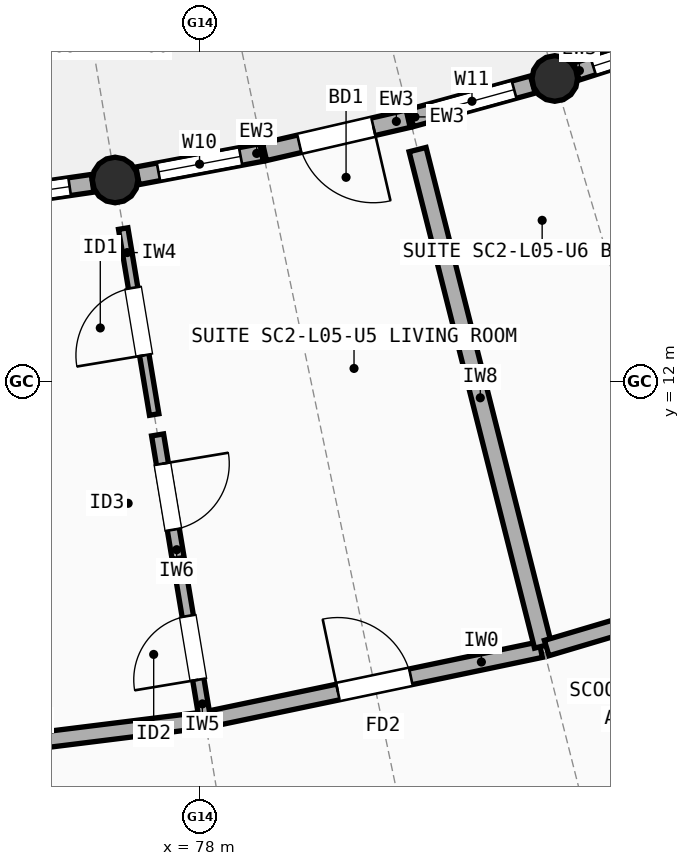
"""IFC4 building model, lengths in metres.
Left out: names, types, materials, properties, quantities, classifications, styles, units other than length and angle.
Written with IfcOpenShell. Run it as: python <this file> out.ifc"""

import sys

from ifc_helpers import new_model, si_unit, direction, frame, frame_2d, origin, origin_2d, place, context, subcontext, project, spatial, rectangle, circle, extrude, element, fill, save


model = new_model("IFC4")
c1 = context("Model", 3, precision=1e-05, world=origin(), true_north=direction((0.0, 1.0)))
c2 = subcontext(c1, "Body", "Model", "MODEL_VIEW")
j1 = project(units=[si_unit("LENGTHUNIT", "METRE"), si_unit("PLANEANGLEUNIT", "RADIAN")], contexts=[c1])
p1 = place(None, origin())
s1 = spatial("IfcSite", under=j1, at=p1, CompositionType="ELEMENT")
p2 = place(p1, origin())
s2 = spatial("IfcBuilding", under=s1, at=p2, CompositionType="ELEMENT")
p3 = place(p2, frame((0.0, 0.0, 17.3)))
s3 = spatial("IfcBuildingStorey", under=s2, at=p3, CompositionType="ELEMENT", Elevation=17.3)
for number, where, z_axis, x_axis in (
    (1, (76.885, 14.652, 0.0), (0.0, 0.0, 1.0), (1.0, 0.0, 0.0)),
    (2, (82.669, 15.988, 0.0), (0.0, 0.0, 1.0), (1.0, 0.0, 0.0)),
):
    element("IfcColumn", number, at=place(p3, frame(where, z_axis=z_axis, x_axis=x_axis)), inside=s3, PredefinedType="COLUMN", context=c2, shape_type="SweptSolid", body=[
        extrude(circle(Radius=0.3, at=origin_2d()), origin(), (0.0, 0.0, 1.0), 2.94),
    ])
p4 = place(p3, frame((74.945, 14.37, 0.0), z_axis=(0.0, 0.0, 1.0), x_axis=(0.989602429917, 0.14382986721, 0.0)))
e3 = element("IfcWall", 3, at=p4, inside=s3, PredefinedType="STANDARD", context=c2, shape_type="SweptSolid", body=[
    extrude(rectangle(XDim=1.66, YDim=0.235, at=frame_2d((0.83, 0.0))), origin(), (0.0, 0.0, 1.0), 2.676),
])
p5 = place(p4, frame((0.305, 0.0, 0.85)))
e4 = element("IfcOpeningElement", 4, at=p5, cuts=e3, PredefinedType="OPENING", context=c2, shape_type="SweptSolid", body=[
    extrude(rectangle(XDim=1.05, YDim=1.35, at=frame_2d((0.525, 0.675))), frame((0.0, 0.127, 0.0), z_axis=(0.0, -1.0, 0.0), x_axis=(1.0, 0.0, 0.0)), (0.0, 0.0, 1.0), 0.255),
])
p6 = place(p3, frame((77.179, 14.708, 0.0), z_axis=(0.0, 0.0, 1.0), x_axis=(0.982820537681, 0.184563784945, 0.0)))
e5 = element("IfcWall", 5, at=p6, inside=s3, PredefinedType="STANDARD", context=c2, shape_type="SweptSolid", body=[
    extrude(rectangle(XDim=1.66, YDim=0.235, at=frame_2d((0.83, 0.0))), origin(), (0.0, 0.0, 1.0), 2.676),
])
p7 = place(p6, frame((0.28, 0.0, 0.85)))
e6 = element("IfcOpeningElement", 6, at=p7, cuts=e5, PredefinedType="OPENING", context=c2, shape_type="SweptSolid", body=[
    extrude(rectangle(XDim=1.1, YDim=1.45, at=frame_2d((0.55, 0.725))), frame((0.0, 0.127, 0.0), z_axis=(0.0, -1.0, 0.0), x_axis=(1.0, 0.0, 0.0)), (0.0, 0.0, 1.0), 0.255),
])
p8 = place(p3, frame((78.85, 15.022, 0.0), z_axis=(0.0, 0.0, 1.0), x_axis=(0.974359373104, 0.224997360081, 0.0)))
e7 = element("IfcWall", 7, at=p8, inside=s3, PredefinedType="STANDARD", context=c2, shape_type="SweptSolid", body=[
    extrude(rectangle(XDim=1.94, YDim=0.235, at=frame_2d((0.97, 0.0))), origin(), (0.0, 0.0, 1.0), 2.676),
])
p9 = place(p8, frame((0.47, 0.0, 0.0)))
e8 = element("IfcOpeningElement", 8, at=p9, cuts=e7, PredefinedType="OPENING", context=c2, shape_type="SweptSolid", body=[
    extrude(rectangle(XDim=1.0, YDim=2.15, at=frame_2d((0.5, 1.075))), frame((0.0, 0.127, 0.0), z_axis=(0.0, -1.0, 0.0), x_axis=(1.0, 0.0, 0.0)), (0.0, 0.0, 1.0), 0.255),
])
p10 = place(p3, frame((80.779, 15.468, 0.0), z_axis=(0.0, 0.0, 1.0), x_axis=(0.964276805489, 0.264896663619, 0.0)))
e9 = element("IfcWall", 9, at=p10, inside=s3, PredefinedType="STANDARD", context=c2, shape_type="SweptSolid", body=[
    extrude(rectangle(XDim=1.66, YDim=0.235, at=frame_2d((0.83, 0.0))), origin(), (0.0, 0.0, 1.0), 2.676),
])
p11 = place(p10, frame((0.255, 0.0, 0.85)))
e10 = element("IfcOpeningElement", 10, at=p11, cuts=e9, PredefinedType="OPENING", context=c2, shape_type="SweptSolid", body=[
    extrude(rectangle(XDim=1.15, YDim=1.45, at=frame_2d((0.575, 0.725))), frame((0.0, 0.127, 0.0), z_axis=(0.0, -1.0, 0.0), x_axis=(1.0, 0.0, 0.0)), (0.0, 0.0, 1.0), 0.255),
])
p12 = place(p3, frame((82.955, 16.079, 0.0), z_axis=(0.0, 0.0, 1.0), x_axis=(0.952523149859, 0.304466170508, 0.0)))
e11 = element("IfcWall", 11, at=p12, inside=s3, PredefinedType="STANDARD", context=c2, shape_type="SweptSolid", body=[
    extrude(rectangle(XDim=1.66, YDim=0.235, at=frame_2d((0.83, 0.0))), origin(), (0.0, 0.0, 1.0), 2.676),
])
p13 = place(p12, frame((0.23, 0.0, 0.85)))
e12 = element("IfcOpeningElement", 12, at=p13, cuts=e11, PredefinedType="OPENING", context=c2, shape_type="SweptSolid", body=[
    extrude(rectangle(XDim=1.2, YDim=1.35, at=frame_2d((0.6, 0.675))), frame((0.0, 0.127, 0.0), z_axis=(0.0, -1.0, 0.0), x_axis=(1.0, 0.0, 0.0)), (0.0, 0.0, 1.0), 0.255),
])
p14 = place(p3, frame((73.589, 6.993, 0.0), z_axis=(0.0, 0.0, 1.0), x_axis=(0.992349088432, 0.123463705959, 0.0)))
e13 = element("IfcWall", 13, at=p14, inside=s3, PredefinedType="SOLIDWALL", context=c2, shape_type="SweptSolid", body=[
    extrude(rectangle(XDim=4.473, YDim=0.21, at=frame_2d((2.236, 0.0))), origin(), (0.0, 0.0, 1.0), 2.714),
])
p15 = place(p3, frame((78.107, 7.558, 0.0), z_axis=(0.0, 0.0, 1.0), x_axis=(0.978806148413, 0.204788973894, 0.0)))
e14 = element("IfcWall", 14, at=p15, inside=s3, PredefinedType="SOLIDWALL", context=c2, shape_type="SweptSolid", body=[
    extrude(rectangle(XDim=4.473, YDim=0.21, at=frame_2d((2.236, 0.0))), origin(), (0.0, 0.0, 1.0), 2.754),
])
p16 = place(p15, frame((1.747, 0.0, 0.0)))
e15 = element("IfcOpeningElement", 15, at=p16, cuts=e14, PredefinedType="OPENING", context=c2, shape_type="SweptSolid", body=[
    extrude(rectangle(XDim=0.98, YDim=2.15, at=frame_2d((0.49, 1.075))), frame((0.0, 0.115, 0.0), z_axis=(0.0, -1.0, 0.0), x_axis=(1.0, 0.0, 0.0)), (0.0, 0.0, 1.0), 0.23),
])
p17 = place(p3, frame((76.991, 14.013, 0.0), z_axis=(0.0, 0.0, 1.0), x_axis=(0.16420741421, -0.986425833562, 0.0)))
e16 = element("IfcWall", 16, at=p17, inside=s3, PredefinedType="PARTITIONING", context=c2, shape_type="SweptSolid", body=[
    extrude(rectangle(XDim=2.48, YDim=0.125, at=frame_2d((1.24, 0.0))), origin(), (0.0, 0.0, 1.0), 2.734),
])
p18 = place(p17, frame((0.79, 0.0, 0.0)))
e17 = element("IfcOpeningElement", 17, at=p18, cuts=e16, PredefinedType="OPENING", context=c2, shape_type="SweptSolid", body=[
    extrude(rectangle(XDim=0.9, YDim=2.1, at=frame_2d((0.45, 1.05))), frame((0.0, 0.073, 0.0), z_axis=(0.0, -1.0, 0.0), x_axis=(1.0, 0.0, 0.0)), (0.0, 0.0, 1.0), 0.145),
])
p19 = place(p3, frame((77.443, 11.298, 0.0), z_axis=(0.0, 0.0, 1.0), x_axis=(0.164158726706, -0.986433937193, 0.0)))
e18 = element("IfcWall", 18, at=p19, inside=s3, PredefinedType="PLUMBINGWALL", context=c2, shape_type="SweptSolid", body=[
    extrude(rectangle(XDim=1.648, YDim=0.16, at=frame_2d((0.824, 0.0))), origin(), (0.0, 0.0, 1.0), 2.734),
])
p20 = place(p19, frame((0.384, 0.0, 0.0)))
e19 = element("IfcOpeningElement", 19, at=p20, cuts=e18, PredefinedType="OPENING", context=c2, shape_type="SweptSolid", body=[
    extrude(rectangle(XDim=0.88, YDim=2.1, at=frame_2d((0.44, 1.05))), frame((0.0, 0.09, 0.0), z_axis=(0.0, -1.0, 0.0), x_axis=(1.0, 0.0, 0.0)), (0.0, 0.0, 1.0), 0.18),
])
p21 = place(p3, frame((77.759, 9.404, 0.0), z_axis=(0.0, 0.0, 1.0), x_axis=(0.164269882379, -0.986415432636, 0.0)))
e20 = element("IfcWall", 20, at=p21, inside=s3, PredefinedType="PARTITIONING", context=c2, shape_type="SweptSolid", body=[
    extrude(rectangle(XDim=1.84, YDim=0.15, at=frame_2d((0.92, 0.0))), origin(), (0.0, 0.0, 1.0), 2.734),
])
p22 = place(p21, frame((0.495, 0.0, 0.0)))
e21 = element("IfcOpeningElement", 21, at=p22, cuts=e20, PredefinedType="OPENING", context=c2, shape_type="SweptSolid", body=[
    extrude(rectangle(XDim=0.85, YDim=2.1, at=frame_2d((0.425, 1.05))), frame((0.0, 0.085, 0.0), z_axis=(0.0, -1.0, 0.0), x_axis=(1.0, 0.0, 0.0)), (0.0, 0.0, 1.0), 0.17),
])
p23 = place(p3, frame((80.864, 15.052, 0.0), z_axis=(0.0, 0.0, 1.0), x_axis=(0.244982481903, -0.969527505314, 0.0)))
e22 = element("IfcWall", 22, at=p23, inside=s3, PredefinedType="SOLIDWALL", context=c2, shape_type="SweptSolid", body=[
    extrude(rectangle(XDim=6.736, YDim=0.23, at=frame_2d((3.368, 0.0))), origin(), (0.0, 0.0, 1.0), 2.714),
])
p24 = place(p3, frame((82.562, 8.494, 0.0), z_axis=(0.0, 0.0, 1.0), x_axis=(0.958602413557, 0.28474798107, 0.0)))
e23 = element("IfcWall", 23, at=p24, inside=s3, PredefinedType="SOLIDWALL", context=c2, shape_type="SweptSolid", body=[
    extrude(rectangle(XDim=4.473, YDim=0.21, at=frame_2d((2.236, 0.0))), origin(), (0.0, 0.0, 1.0), 2.734),
])
p25 = place(p5, origin())
e24 = element("IfcWindow", 24, at=p25, inside=s3, PartitioningType="SINGLE_PANEL", PredefinedType="WINDOW", context=c2, shape_type="SweptSolid", body=[
    extrude(rectangle(XDim=1.05, YDim=1.35, at=frame_2d((0.525, 0.675))), frame((0.0, 0.03, 0.0), z_axis=(0.0, -1.0, 0.0), x_axis=(1.0, 0.0, 0.0)), (0.0, 0.0, 1.0), 0.06),
])
fill(e4, e24)
p26 = place(p7, origin())
e25 = element("IfcWindow", 25, at=p26, inside=s3, PartitioningType="SINGLE_PANEL", PredefinedType="WINDOW", context=c2, shape_type="SweptSolid", body=[
    extrude(rectangle(XDim=1.1, YDim=1.45, at=frame_2d((0.55, 0.725))), frame((0.0, 0.03, 0.0), z_axis=(0.0, -1.0, 0.0), x_axis=(1.0, 0.0, 0.0)), (0.0, 0.0, 1.0), 0.06),
])
fill(e6, e25)
p27 = place(p9, origin())
e26 = element("IfcDoor", 26, at=p27, inside=s3, OperationType="SINGLE_SWING_RIGHT", PredefinedType="DOOR", context=c2, shape_type="SweptSolid", body=[
    extrude(rectangle(XDim=1.0, YDim=2.15, at=frame_2d((0.5, 1.075))), frame((0.0, 0.025, 0.0), z_axis=(0.0, -1.0, 0.0), x_axis=(1.0, 0.0, 0.0)), (0.0, 0.0, 1.0), 0.05),
])
fill(e8, e26)
p28 = place(p11, origin())
e27 = element("IfcWindow", 27, at=p28, inside=s3, PartitioningType="SINGLE_PANEL", PredefinedType="WINDOW", context=c2, shape_type="SweptSolid", body=[
    extrude(rectangle(XDim=1.15, YDim=1.45, at=frame_2d((0.575, 0.725))), frame((0.0, 0.03, 0.0), z_axis=(0.0, -1.0, 0.0), x_axis=(1.0, 0.0, 0.0)), (0.0, 0.0, 1.0), 0.06),
])
fill(e10, e27)
p29 = place(p13, origin())
e28 = element("IfcWindow", 28, at=p29, inside=s3, PartitioningType="SINGLE_PANEL", PredefinedType="WINDOW", context=c2, shape_type="SweptSolid", body=[
    extrude(rectangle(XDim=1.2, YDim=1.35, at=frame_2d((0.6, 0.675))), frame((0.0, 0.03, 0.0), z_axis=(0.0, -1.0, 0.0), x_axis=(1.0, 0.0, 0.0)), (0.0, 0.0, 1.0), 0.06),
])
fill(e12, e28)
p30 = place(p16, origin())
e29 = element("IfcDoor", 29, at=p30, inside=s3, OperationType="SINGLE_SWING_LEFT", PredefinedType="DOOR", context=c2, shape_type="SweptSolid", body=[
    extrude(rectangle(XDim=0.98, YDim=2.15, at=frame_2d((0.49, 1.075))), frame((0.0, 0.025, 0.0), z_axis=(0.0, -1.0, 0.0), x_axis=(1.0, 0.0, 0.0)), (0.0, 0.0, 1.0), 0.05),
])
fill(e15, e29)
p31 = place(p18, origin())
e30 = element("IfcDoor", 30, at=p31, inside=s3, OperationType="SINGLE_SWING_RIGHT", PredefinedType="DOOR", context=c2, shape_type="SweptSolid", body=[
    extrude(rectangle(XDim=0.9, YDim=2.1, at=frame_2d((0.45, 1.05))), frame((0.0, 0.025, 0.0), z_axis=(0.0, -1.0, 0.0), x_axis=(1.0, 0.0, 0.0)), (0.0, 0.0, 1.0), 0.05),
])
fill(e17, e30)
p32 = place(p20, origin())
e31 = element("IfcDoor", 31, at=p32, inside=s3, OperationType="SINGLE_SWING_LEFT", PredefinedType="DOOR", context=c2, shape_type="SweptSolid", body=[
    extrude(rectangle(XDim=0.88, YDim=2.1, at=frame_2d((0.44, 1.05))), frame((0.0, 0.025, 0.0), z_axis=(0.0, -1.0, 0.0), x_axis=(1.0, 0.0, 0.0)), (0.0, 0.0, 1.0), 0.05),
])
fill(e19, e31)
p33 = place(p22, origin())
e32 = element("IfcDoor", 32, at=p33, inside=s3, OperationType="SINGLE_SWING_RIGHT", PredefinedType="DOOR", context=c2, shape_type="SweptSolid", body=[
    extrude(rectangle(XDim=0.85, YDim=2.1, at=frame_2d((0.425, 1.05))), frame((0.0, 0.025, 0.0), z_axis=(0.0, -1.0, 0.0), x_axis=(1.0, 0.0, 0.0)), (0.0, 0.0, 1.0), 0.05),
])
fill(e21, e32)
save(model, sys.argv[1])
